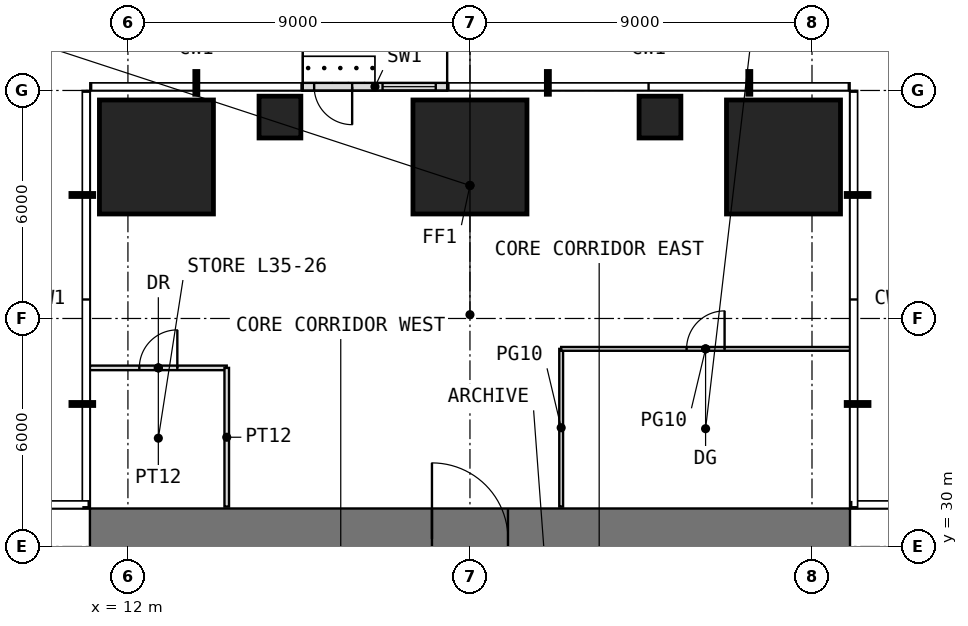
"""IFC4 building model, lengths in metres.
Left out: names, types, materials, properties, quantities, classifications, styles, units other than length and angle.
Written with IfcOpenShell. Run it as: python <this file> out.ifc"""

import sys

from ifc_helpers import new_model, si_unit, direction, frame, frame_2d, origin, origin_2d, place, context, subcontext, project, spatial, rectangle, extrude, element, fill, save


model = new_model("IFC4")
c1 = context("Model", 3, precision=1e-05, world=origin(), true_north=direction((0.0, 1.0)))
c2 = subcontext(c1, "Body", "Model", "MODEL_VIEW")
j1 = project(units=[si_unit("LENGTHUNIT", "METRE"), si_unit("PLANEANGLEUNIT", "RADIAN")], contexts=[c1])
p1 = place(None, origin())
s1 = spatial("IfcSite", under=j1, at=p1, CompositionType="ELEMENT")
p2 = place(p1, origin())
s2 = spatial("IfcBuilding", under=s1, at=p2, CompositionType="ELEMENT")
p3 = place(p2, frame((0.0, 0.0, 148.5)))
s3 = spatial("IfcBuildingStorey", under=s2, at=p3, CompositionType="ELEMENT", Elevation=148.5)
p4 = place(p3, frame((12.75, 40.25, 0.0), z_axis=(0.0, 0.0, 1.0), x_axis=(1.0, 0.0, 0.0)))
e1 = element("IfcColumn", 1, at=p4, inside=s3, PredefinedType="COLUMN", context=c2, shape_type="SweptSolid", body=[
    extrude(rectangle(XDim=3.0, YDim=3.0, at=origin_2d()), origin(), (0.0, 0.0, 1.0), 4.0),
])
p5 = place(p3, frame((16.0, 41.3, 0.0), z_axis=(0.0, 0.0, 1.0), x_axis=(1.0, 0.0, 0.0)))
e2 = element("IfcColumn", 2, at=p5, inside=s3, PredefinedType="COLUMN", context=c2, shape_type="SweptSolid", body=[
    extrude(rectangle(XDim=1.1, YDim=1.1, at=origin_2d()), origin(), (0.0, 0.0, 1.0), 4.0),
])
p6 = place(p3, frame((21.0, 40.25, 0.0), z_axis=(0.0, 0.0, 1.0), x_axis=(1.0, 0.0, 0.0)))
e3 = element("IfcColumn", 3, at=p6, inside=s3, PredefinedType="COLUMN", context=c2, shape_type="SweptSolid", body=[
    extrude(rectangle(XDim=3.0, YDim=3.0, at=origin_2d()), origin(), (0.0, 0.0, 1.0), 4.0),
])
p7 = place(p3, frame((26.0, 41.3, 0.0), z_axis=(0.0, 0.0, 1.0), x_axis=(1.0, 0.0, 0.0)))
e4 = element("IfcColumn", 4, at=p7, inside=s3, PredefinedType="COLUMN", context=c2, shape_type="SweptSolid", body=[
    extrude(rectangle(XDim=1.1, YDim=1.1, at=origin_2d()), origin(), (0.0, 0.0, 1.0), 4.0),
])
p8 = place(p3, frame((29.25, 40.25, 0.0), z_axis=(0.0, 0.0, 1.0), x_axis=(1.0, 0.0, 0.0)))
e5 = element("IfcColumn", 5, at=p8, inside=s3, PredefinedType="COLUMN", context=c2, shape_type="SweptSolid", body=[
    extrude(rectangle(XDim=3.0, YDim=3.0, at=origin_2d()), origin(), (0.0, 0.0, 1.0), 4.0),
])
p9 = place(p3, frame((20.4, 42.1, 0.0), z_axis=(0.0, 0.0, 1.0), x_axis=(-1.0, 0.0, 0.0)))
e6 = element("IfcWall", 6, at=p9, inside=s3, PredefinedType="USERDEFINED", context=c2, shape_type="SweptSolid", body=[
    extrude(rectangle(XDim=3.8, YDim=0.2, at=frame_2d((1.9, 0.0))), origin(), (0.0, 0.0, 1.0), 3.75),
])
p10 = place(p9, frame((2.5, 0.0, 0.0)))
e7 = element("IfcOpeningElement", 7, at=p10, cuts=e6, PredefinedType="OPENING", context=c2, shape_type="SweptSolid", body=[
    extrude(rectangle(XDim=1.0, YDim=2.4, at=frame_2d((0.5, 1.2))), frame((0.0, 0.11, 0.0), z_axis=(0.0, -1.0, 0.0), x_axis=(1.0, 0.0, 0.0)), (0.0, 0.0, 1.0), 0.22),
])
p11 = place(p9, frame((0.3, 0.0, 0.3)))
e8 = element("IfcOpeningElement", 8, at=p11, cuts=e6, PredefinedType="OPENING", context=c2, shape_type="SweptSolid", body=[
    extrude(rectangle(XDim=1.4, YDim=2.7, at=frame_2d((0.7, 1.35))), frame((0.0, 0.11, 0.0), z_axis=(0.0, -1.0, 0.0), x_axis=(1.0, 0.0, 0.0)), (0.0, 0.0, 1.0), 0.22),
])
p12 = place(p3, frame((11.0, 30.2, -0.05), z_axis=(0.0, 0.0, 1.0), x_axis=(1.0, 0.0, 0.0)))
e9 = element("IfcWall", 9, at=p12, inside=s3, PredefinedType="SHEAR", context=c2, shape_type="SweptSolid", body=[
    extrude(rectangle(XDim=20.0, YDim=1.6, at=frame_2d((10.0, 0.0))), origin(), (0.0, 0.0, 1.0), 4.0),
])
p13 = place(p12, frame((9.0, 0.0, 0.05)))
e10 = element("IfcOpeningElement", 10, at=p13, cuts=e9, PredefinedType="OPENING", context=c2, shape_type="SweptSolid", body=[
    extrude(rectangle(XDim=2.0, YDim=2.2, at=frame_2d((1.0, 1.1))), frame((0.0, 0.81, 0.0), z_axis=(0.0, -1.0, 0.0), x_axis=(1.0, 0.0, 0.0)), (0.0, 0.0, 1.0), 1.62),
])
p14 = place(p3, frame((11.0, 34.7, 0.0), z_axis=(0.0, 0.0, 1.0), x_axis=(1.0, 0.0, 0.0)))
e11 = element("IfcWall", 11, at=p14, inside=s3, PredefinedType="PARTITIONING", context=c2, shape_type="SweptSolid", body=[
    extrude(rectangle(XDim=3.6, YDim=0.12, at=frame_2d((1.8, 0.0))), origin(), (0.0, 0.0, 1.0), 3.75),
])
p15 = place(p14, frame((1.3, 0.0, 0.0)))
e12 = element("IfcOpeningElement", 12, at=p15, cuts=e11, PredefinedType="OPENING", context=c2, shape_type="SweptSolid", body=[
    extrude(rectangle(XDim=1.0, YDim=2.2, at=frame_2d((0.5, 1.1))), frame((0.0, 0.07, 0.0), z_axis=(0.0, -1.0, 0.0), x_axis=(1.0, 0.0, 0.0)), (0.0, 0.0, 1.0), 0.14),
])
p16 = place(p3, frame((14.6, 31.05, 0.0), z_axis=(0.0, 0.0, 1.0), x_axis=(0.0, 1.0, 0.0)))
e13 = element("IfcWall", 13, at=p16, inside=s3, PredefinedType="PARTITIONING", context=c2, shape_type="SweptSolid", body=[
    extrude(rectangle(XDim=3.65, YDim=0.12, at=frame_2d((1.825, 0.0))), origin(), (0.0, 0.0, 1.0), 3.75),
])
p17 = place(p3, frame((23.4, 31.05, 0.0), z_axis=(0.0, 0.0, 1.0), x_axis=(0.0, 1.0, 0.0)))
e14 = element("IfcWall", 14, at=p17, inside=s3, PredefinedType="PARTITIONING", context=c2, shape_type="SweptSolid", body=[
    extrude(rectangle(XDim=4.15, YDim=0.1, at=frame_2d((2.075, 0.0))), origin(), (0.0, 0.0, 1.0), 3.75),
])
p18 = place(p3, frame((23.4, 35.2, 0.0), z_axis=(0.0, 0.0, 1.0), x_axis=(1.0, 0.0, 0.0)))
e15 = element("IfcWall", 15, at=p18, inside=s3, PredefinedType="PARTITIONING", context=c2, shape_type="SweptSolid", body=[
    extrude(rectangle(XDim=7.6, YDim=0.1, at=frame_2d((3.8, 0.0))), origin(), (0.0, 0.0, 1.0), 3.75),
])
p19 = place(p18, frame((3.3, 0.0, 0.0)))
e16 = element("IfcOpeningElement", 16, at=p19, cuts=e15, PredefinedType="OPENING", context=c2, shape_type="SweptSolid", body=[
    extrude(rectangle(XDim=1.0, YDim=2.4, at=frame_2d((0.5, 1.2))), frame((0.0, 0.06, 0.0), z_axis=(0.0, -1.0, 0.0), x_axis=(1.0, 0.0, 0.0)), (0.0, 0.0, 1.0), 0.12),
])
p20 = place(p10, origin())
e17 = element("IfcDoor", 17, at=p20, inside=s3, OperationType="SINGLE_SWING_LEFT", PredefinedType="DOOR", context=c2, shape_type="SweptSolid", body=[
    extrude(rectangle(XDim=1.0, YDim=2.4, at=frame_2d((0.5, 1.2))), frame((0.0, 0.025, 0.0), z_axis=(0.0, -1.0, 0.0), x_axis=(1.0, 0.0, 0.0)), (0.0, 0.0, 1.0), 0.05),
])
fill(e7, e17)
p21 = place(p11, origin())
e18 = element("IfcWindow", 18, at=p21, inside=s3, PartitioningType="SINGLE_PANEL", PredefinedType="WINDOW", context=c2, shape_type="SweptSolid", body=[
    extrude(rectangle(XDim=1.4, YDim=2.7, at=frame_2d((0.7, 1.35))), frame((0.0, 0.03, 0.0), z_axis=(0.0, -1.0, 0.0), x_axis=(1.0, 0.0, 0.0)), (0.0, 0.0, 1.0), 0.06),
])
fill(e8, e18)
p22 = place(p13, origin())
e19 = element("IfcDoor", 19, at=p22, inside=s3, OperationType="DOUBLE_DOOR_SINGLE_SWING", PredefinedType="DOOR", context=c2, shape_type="SweptSolid", body=[
    extrude(rectangle(XDim=2.0, YDim=2.2, at=frame_2d((1.0, 1.1))), frame((0.0, 0.025, 0.0), z_axis=(0.0, -1.0, 0.0), x_axis=(1.0, 0.0, 0.0)), (0.0, 0.0, 1.0), 0.05),
])
fill(e10, e19)
p23 = place(p15, origin())
e20 = element("IfcDoor", 20, at=p23, inside=s3, OperationType="SINGLE_SWING_RIGHT", PredefinedType="DOOR", context=c2, shape_type="SweptSolid", body=[
    extrude(rectangle(XDim=1.0, YDim=2.2, at=frame_2d((0.5, 1.1))), frame((0.0, 0.025, 0.0), z_axis=(0.0, -1.0, 0.0), x_axis=(1.0, 0.0, 0.0)), (0.0, 0.0, 1.0), 0.05),
])
fill(e12, e20)
p24 = place(p19, origin())
e21 = element("IfcDoor", 21, at=p24, inside=s3, OperationType="SINGLE_SWING_RIGHT", PredefinedType="DOOR", context=c2, shape_type="SweptSolid", body=[
    extrude(rectangle(XDim=1.0, YDim=2.4, at=frame_2d((0.5, 1.2))), frame((0.0, 0.025, 0.0), z_axis=(0.0, -1.0, 0.0), x_axis=(1.0, 0.0, 0.0)), (0.0, 0.0, 1.0), 0.05),
])
fill(e16, e21)
save(model, sys.argv[1])
